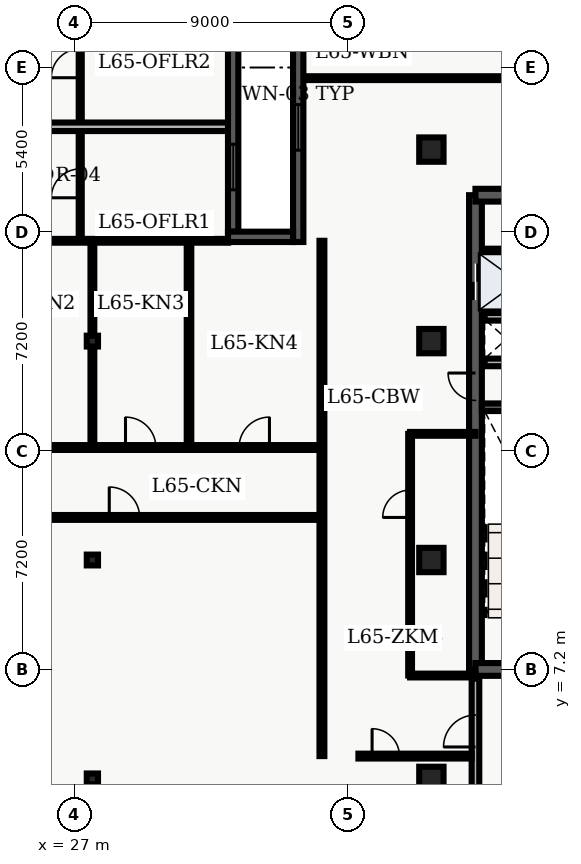
"""IFC4 building model, lengths in metres.
Left out: names, types, materials, properties, quantities, classifications, styles, units other than length and angle.
Written with IfcOpenShell. Run it as: python <this file> out.ifc"""

import sys

from ifc_helpers import new_model, entity, si_unit, converted_unit, direction, frame, origin_with_axes, origin_2d_with_axis, place, context, subcontext, project, spatial, polyline, rectangle, i_section, outline, extrude, element, fill, save


model = new_model("IFC4")
c1 = context("Model", 3, precision=1e-05, world=origin_with_axes(), true_north=direction((0.0, 1.0)))
c2 = subcontext(c1, "Body", "Model", "MODEL_VIEW")
j1 = project(units=[si_unit("LENGTHUNIT", "METRE"), converted_unit("PLANEANGLEUNIT", "DEGREE", entity("IfcPlaneAngleMeasure", 0.017), si_unit("PLANEANGLEUNIT", "RADIAN"), dimensions=[0, 0, 0, 0, 0, 0, 0])], contexts=[c1])
p1 = place(None, origin_with_axes())
s1 = spatial("IfcSite", under=j1, at=p1, CompositionType="ELEMENT")
p2 = place(p1, origin_with_axes())
s2 = spatial("IfcBuilding", under=s1, at=p2, CompositionType="ELEMENT")
p3 = place(p2, frame((0.0, 0.0, 264.6), z_axis=(0.0, 0.0, 1.0), x_axis=(1.0, 0.0, 0.0)))
s3 = spatial("IfcBuildingStorey", under=s2, at=p3, CompositionType="ELEMENT", Elevation=264.6)
p4 = place(p3, frame((40.2, 7.2, 0.0), z_axis=(0.0, 0.0, 1.0), x_axis=(0.0, 1.0, 0.0)))
e1 = element("IfcWall", 1, at=p4, inside=s3, PredefinedType="SHEAR", context=c2, shape_type="SweptSolid", body=[
    extrude(outline(polyline([(0.0, -0.21), (15.6, -0.21), (15.6, 0.21), (0.0, 0.21), (0.0, -0.21)])), origin_with_axes(), (0.0, 0.0, 1.0), 3.66),
])
p5 = place(p4, frame((12.75, 0.0, 0.0), z_axis=(0.0, 0.0, 1.0), x_axis=(1.0, 0.0, 0.0)))
e2 = element("IfcOpeningElement", 2, at=p5, cuts=e1, PredefinedType="OPENING", context=c2, shape_type="SweptSolid", body=[
    extrude(rectangle(XDim=1.2, YDim=0.44, at=origin_2d_with_axis()), origin_with_axes(), (0.0, 0.0, 1.0), 2.15),
])
p6 = place(p4, frame((9.3, 0.0, 0.0), z_axis=(0.0, 0.0, 1.0), x_axis=(1.0, 0.0, 0.0)))
e3 = element("IfcOpeningElement", 3, at=p6, cuts=e1, PredefinedType="OPENING", context=c2, shape_type="SweptSolid", body=[
    extrude(rectangle(XDim=0.9, YDim=0.44, at=origin_2d_with_axis()), origin_with_axes(), (0.0, 0.0, 1.0), 2.15),
])
p7 = place(p3, frame((40.2, 7.2, 0.0), z_axis=(0.0, 0.0, 1.0), x_axis=(1.0, 0.0, 0.0)))
e4 = element("IfcWall", 4, at=p7, inside=s3, PredefinedType="SHEAR", context=c2, shape_type="SweptSolid", body=[
    extrude(outline(polyline([(0.0, -0.21), (7.85, -0.21), (7.85, 0.21), (0.0, 0.21), (0.0, -0.21)])), origin_with_axes(), (0.0, 0.0, 1.0), 3.66),
])
p8 = place(p7, frame((2.175, 0.0, 0.0), z_axis=(0.0, 0.0, 1.0), x_axis=(1.0, 0.0, 0.0)))
e5 = element("IfcOpeningElement", 5, at=p8, cuts=e4, PredefinedType="OPENING", context=c2, shape_type="SweptSolid", body=[
    extrude(rectangle(XDim=1.05, YDim=0.44, at=origin_2d_with_axis()), origin_with_axes(), (0.0, 0.0, 1.0), 2.15),
])
p9 = place(p3, frame((40.2, 22.8, 0.0), z_axis=(0.0, 0.0, 1.0), x_axis=(1.0, 0.0, 0.0)))
e6 = element("IfcWall", 6, at=p9, inside=s3, PredefinedType="SHEAR", context=c2, shape_type="SweptSolid", body=[
    extrude(outline(polyline([(0.0, -0.21), (7.85, -0.21), (7.85, 0.21), (0.0, 0.21), (0.0, -0.21)])), origin_with_axes(), (0.0, 0.0, 1.0), 3.66),
])
p10 = place(p9, frame((5.775, 0.0, 0.0), z_axis=(0.0, 0.0, 1.0), x_axis=(1.0, 0.0, 0.0)))
e7 = element("IfcOpeningElement", 7, at=p10, cuts=e6, PredefinedType="OPENING", context=c2, shape_type="SweptSolid", body=[
    extrude(rectangle(XDim=1.05, YDim=0.44, at=origin_2d_with_axis()), origin_with_axes(), (0.0, 0.0, 1.0), 2.15),
])
p11 = place(p9, frame((2.15, 0.0, 0.0), z_axis=(0.0, 0.0, 1.0), x_axis=(1.0, 0.0, 0.0)))
e8 = element("IfcOpeningElement", 8, at=p11, cuts=e6, PredefinedType="OPENING", context=c2, shape_type="SweptSolid", body=[
    extrude(rectangle(XDim=0.9, YDim=0.44, at=origin_2d_with_axis()), origin_with_axes(), (0.0, 0.0, 1.0), 2.15),
])
p12 = place(p3, frame((40.41, 15.825, 0.0), z_axis=(0.0, 0.0, 1.0), x_axis=(1.0, 0.0, 0.0)))
e9 = element("IfcWall", 9, at=p12, inside=s3, PredefinedType="SHEAR", context=c2, shape_type="SweptSolid", body=[
    extrude(outline(polyline([(0.0, -0.125), (3.59, -0.125), (3.59, 0.125), (0.0, 0.125), (0.0, -0.125)])), origin_with_axes(), (0.0, 0.0, 1.0), 3.66),
])
p13 = place(p3, frame((40.5, 17.3, 0.0), z_axis=(0.0, 0.0, 1.0), x_axis=(1.0, 0.0, 0.0)))
e10 = element("IfcWall", 10, at=p13, inside=s3, PredefinedType="SOLIDWALL", context=c2, shape_type="SweptSolid", body=[
    extrude(outline(polyline([(0.0, -0.125), (3.5, -0.125), (3.5, 0.125), (0.0, 0.125), (0.0, -0.125)])), origin_with_axes(), (0.0, 0.0, 1.0), 2.7),
])
p14 = place(p13, frame((2.4, 0.0, 0.0), z_axis=(0.0, 0.0, 1.0), x_axis=(1.0, 0.0, 0.0)))
e11 = element("IfcOpeningElement", 11, at=p14, cuts=e10, PredefinedType="OPENING", context=c2, shape_type="SweptSolid", body=[
    extrude(rectangle(XDim=0.9, YDim=0.27, at=origin_2d_with_axis()), origin_with_axes(), (0.0, 0.0, 1.0), 2.15),
])
p15 = place(p3, frame((40.5, 18.8, 0.0), z_axis=(0.0, 0.0, 1.0), x_axis=(1.0, 0.0, 0.0)))
e12 = element("IfcWall", 12, at=p15, inside=s3, PredefinedType="SOLIDWALL", context=c2, shape_type="SweptSolid", body=[
    extrude(outline(polyline([(0.0, -0.125), (3.5, -0.125), (3.5, 0.125), (0.0, 0.125), (0.0, -0.125)])), origin_with_axes(), (0.0, 0.0, 1.0), 2.7),
])
p16 = place(p3, frame((40.2, 3.1, 0.0), z_axis=(0.0, 0.0, 1.0), x_axis=(0.0, 1.0, 0.0)))
e13 = element("IfcWall", 13, at=p16, inside=s3, PredefinedType="SOLIDWALL", context=c2, shape_type="SweptSolid", body=[
    extrude(outline(polyline([(0.0, -0.125), (3.8, -0.125), (3.8, 0.125), (0.0, 0.125), (0.0, -0.125)])), origin_with_axes(), (0.0, 0.0, 1.0), 2.7),
])
p17 = place(p16, frame((2.075, 0.0, 0.0), z_axis=(0.0, 0.0, 1.0), x_axis=(1.0, 0.0, 0.0)))
e14 = element("IfcOpeningElement", 14, at=p17, cuts=e13, PredefinedType="OPENING", context=c2, shape_type="SweptSolid", body=[
    extrude(rectangle(XDim=1.05, YDim=0.27, at=origin_2d_with_axis()), origin_with_axes(), (0.0, 0.0, 1.0), 2.15),
])
for number, where, z_axis, x_axis in (
    (15, (27.6, 3.6, 0.0), (0.0, 0.0, 1.0), (1.0, 0.0, 0.0)),
    (16, (27.6, 10.8, 0.0), (0.0, 0.0, 1.0), (1.0, 0.0, 0.0)),
    (17, (27.6, 18.0, 0.0), (0.0, 0.0, 1.0), (1.0, 0.0, 0.0)),
):
    element("IfcColumn", number, at=place(p3, frame(where, z_axis=z_axis, x_axis=x_axis)), inside=s3, PredefinedType="COLUMN", context=c2, shape_type="SweptSolid", body=[
        extrude(i_section(OverallWidth=0.369, OverallDepth=0.356, WebThickness=0.011, FlangeThickness=0.018, FilletRadius=0.018, at=origin_2d_with_axis()), origin_with_axes(), (0.0, 0.0, 1.0), 3.9),
    ])
for number, where, z_axis, x_axis in (
    (18, (38.75, 3.6, 0.0), (0.0, 0.0, 1.0), (1.0, 0.0, 0.0)),
    (19, (38.75, 10.8, 0.0), (0.0, 0.0, 1.0), (1.0, 0.0, 0.0)),
    (20, (38.75, 18.0, 0.0), (0.0, 0.0, 1.0), (1.0, 0.0, 0.0)),
    (21, (38.75, 24.3, 0.0), (0.0, 0.0, 1.0), (1.0, 0.0, 0.0)),
):
    element("IfcColumn", number, at=place(p3, frame(where, z_axis=z_axis, x_axis=x_axis)), inside=s3, PredefinedType="COLUMN", context=c2, shape_type="SweptSolid", body=[
        extrude(rectangle(XDim=0.8, YDim=0.8, at=origin_2d_with_axis()), origin_with_axes(), (0.0, 0.0, 1.0), 3.9),
    ])
p18 = place(p3, frame((40.5, 20.96, 0.0), z_axis=(0.0, 0.0, 1.0), x_axis=(1.0, 0.0, 0.0)))
e22 = element("IfcWall", 22, at=p18, inside=s3, PredefinedType="PARTITIONING", context=c2, shape_type="SweptSolid", body=[
    extrude(outline(polyline([(0.0, -0.08), (3.5, -0.08), (3.5, 0.08), (0.0, 0.08), (0.0, -0.08)])), origin_with_axes(), (0.0, 0.0, 1.0), 2.7),
])
p19 = place(p3, frame((27.2, 21.4, 0.0), z_axis=(0.0, 0.0, 1.0), x_axis=(0.0, 1.0, 0.0)))
e23 = element("IfcWall", 23, at=p19, inside=s3, PredefinedType="PARTITIONING", context=c2, shape_type="SweptSolid", body=[
    extrude(outline(polyline([(0.0, -0.05), (18.9, -0.05), (18.9, 0.05), (0.0, 0.05), (0.0, -0.05)])), origin_with_axes(), (0.0, 0.0, 1.0), 2.7),
])
p20 = place(p19, frame((1.79, 0.0, 0.0), z_axis=(0.0, 0.0, 1.0), x_axis=(1.0, 0.0, 0.0)))
e24 = element("IfcOpeningElement", 24, at=p20, cuts=e23, PredefinedType="OPENING", context=c2, shape_type="SweptSolid", body=[
    extrude(rectangle(XDim=0.95, YDim=0.12, at=origin_2d_with_axis()), origin_with_axes(), (0.0, 0.0, 1.0), 2.15),
])
p21 = place(p19, frame((5.739, 0.0, 0.0), z_axis=(0.0, 0.0, 1.0), x_axis=(1.0, 0.0, 0.0)))
e25 = element("IfcOpeningElement", 25, at=p21, cuts=e23, PredefinedType="OPENING", context=c2, shape_type="SweptSolid", body=[
    extrude(rectangle(XDim=0.95, YDim=0.12, at=origin_2d_with_axis()), origin_with_axes(), (0.0, 0.0, 1.0), 2.15),
])
p22 = place(p19, frame((10.184, 0.0, 0.0), z_axis=(0.0, 0.0, 1.0), x_axis=(1.0, 0.0, 0.0)))
e26 = element("IfcOpeningElement", 26, at=p22, cuts=e23, PredefinedType="OPENING", context=c2, shape_type="SweptSolid", body=[
    extrude(rectangle(XDim=0.95, YDim=0.12, at=origin_2d_with_axis()), origin_with_axes(), (0.0, 0.0, 1.0), 2.15),
])
p23 = place(p19, frame((14.052, 0.0, 0.0), z_axis=(0.0, 0.0, 1.0), x_axis=(1.0, 0.0, 0.0)))
e27 = element("IfcOpeningElement", 27, at=p23, cuts=e23, PredefinedType="OPENING", context=c2, shape_type="SweptSolid", body=[
    extrude(rectangle(XDim=0.95, YDim=0.12, at=origin_2d_with_axis()), origin_with_axes(), (0.0, 0.0, 1.0), 2.15),
])
p24 = place(p19, frame((17.267, 0.0, 0.0), z_axis=(0.0, 0.0, 1.0), x_axis=(1.0, 0.0, 0.0)))
e28 = element("IfcOpeningElement", 28, at=p24, cuts=e23, PredefinedType="OPENING", context=c2, shape_type="SweptSolid", body=[
    extrude(rectangle(XDim=0.95, YDim=0.12, at=origin_2d_with_axis()), origin_with_axes(), (0.0, 0.0, 1.0), 2.15),
])
p25 = place(p3, frame((20.45, 25.05, 0.0), z_axis=(0.0, 0.0, 1.0), x_axis=(1.0, 0.0, 0.0)))
e29 = element("IfcWall", 29, at=p25, inside=s3, PredefinedType="PARTITIONING", context=c2, shape_type="SweptSolid", body=[
    extrude(outline(polyline([(0.0, -0.14), (11.615, -0.14), (11.615, 0.14), (0.0, 0.14), (0.0, -0.14)])), origin_with_axes(), (0.0, 0.0, 1.0), 2.7),
])
p26 = place(p3, frame((20.3, 12.2, 0.0), z_axis=(0.0, 0.0, 1.0), x_axis=(1.0, 0.0, 0.0)))
e30 = element("IfcWall", 30, at=p26, inside=s3, PredefinedType="PARTITIONING", context=c2, shape_type="SweptSolid", body=[
    extrude(outline(polyline([(0.0, -0.08), (14.85, -0.08), (14.85, 0.08), (0.0, 0.08), (0.0, -0.08)])), origin_with_axes(), (0.0, 0.0, 1.0), 2.7),
])
p27 = place(p26, frame((8.355, 0.0, 0.0), z_axis=(0.0, 0.0, 1.0), x_axis=(1.0, 0.0, 0.0)))
e31 = element("IfcOpeningElement", 31, at=p27, cuts=e30, PredefinedType="OPENING", context=c2, shape_type="SweptSolid", body=[
    extrude(rectangle(XDim=1.0, YDim=0.18, at=origin_2d_with_axis()), origin_with_axes(), (0.0, 0.0, 1.0), 2.15),
])
p28 = place(p3, frame((20.3, 14.5, 0.0), z_axis=(0.0, 0.0, 1.0), x_axis=(1.0, 0.0, 0.0)))
e32 = element("IfcWall", 32, at=p28, inside=s3, PredefinedType="PARTITIONING", context=c2, shape_type="SweptSolid", body=[
    extrude(outline(polyline([(0.0, -0.08), (14.85, -0.08), (14.85, 0.08), (0.0, 0.08), (0.0, -0.08)])), origin_with_axes(), (0.0, 0.0, 1.0), 2.7),
])
p29 = place(p28, frame((1.739, 0.0, 0.0), z_axis=(0.0, 0.0, 1.0), x_axis=(1.0, 0.0, 0.0)))
e33 = element("IfcOpeningElement", 33, at=p29, cuts=e32, PredefinedType="OPENING", context=c2, shape_type="SweptSolid", body=[
    extrude(rectangle(XDim=1.0, YDim=0.18, at=origin_2d_with_axis()), origin_with_axes(), (0.0, 0.0, 1.0), 2.15),
])
p30 = place(p28, frame((5.299, 0.0, 0.0), z_axis=(0.0, 0.0, 1.0), x_axis=(1.0, 0.0, 0.0)))
e34 = element("IfcOpeningElement", 34, at=p30, cuts=e32, PredefinedType="OPENING", context=c2, shape_type="SweptSolid", body=[
    extrude(rectangle(XDim=1.0, YDim=0.18, at=origin_2d_with_axis()), origin_with_axes(), (0.0, 0.0, 1.0), 2.15),
])
p31 = place(p28, frame((8.889, 0.0, 0.0), z_axis=(0.0, 0.0, 1.0), x_axis=(1.0, 0.0, 0.0)))
e35 = element("IfcOpeningElement", 35, at=p31, cuts=e32, PredefinedType="OPENING", context=c2, shape_type="SweptSolid", body=[
    extrude(rectangle(XDim=1.0, YDim=0.18, at=origin_2d_with_axis()), origin_with_axes(), (0.0, 0.0, 1.0), 2.15),
])
p32 = place(p28, frame((12.624, 0.0, 0.0), z_axis=(0.0, 0.0, 1.0), x_axis=(1.0, 0.0, 0.0)))
e36 = element("IfcOpeningElement", 36, at=p32, cuts=e32, PredefinedType="OPENING", context=c2, shape_type="SweptSolid", body=[
    extrude(rectangle(XDim=1.0, YDim=0.18, at=origin_2d_with_axis()), origin_with_axes(), (0.0, 0.0, 1.0), 2.15),
])
p33 = place(p3, frame((35.15, 4.35, 0.0), z_axis=(0.0, 0.0, 1.0), x_axis=(0.0, 1.0, 0.0)))
e37 = element("IfcWall", 37, at=p33, inside=s3, PredefinedType="PARTITIONING", context=c2, shape_type="SweptSolid", body=[
    extrude(outline(polyline([(0.0, -0.08), (16.95, -0.08), (16.95, 0.08), (0.0, 0.08), (0.0, -0.08)])), origin_with_axes(), (0.0, 0.0, 1.0), 2.7),
])
p34 = place(p3, frame((27.6, 14.62, 0.0), z_axis=(0.0, 0.0, 1.0), x_axis=(0.0, 1.0, 0.0)))
e38 = element("IfcWall", 38, at=p34, inside=s3, PredefinedType="PARTITIONING", context=c2, shape_type="SweptSolid", body=[
    extrude(outline(polyline([(0.0, -0.062), (6.6, -0.062), (6.6, 0.062), (0.0, 0.062), (0.0, -0.062)])), origin_with_axes(), (0.0, 0.0, 1.0), 2.7),
])
p35 = place(p3, frame((30.778, 14.62, 0.0), z_axis=(0.0, 0.0, 1.0), x_axis=(0.0, 1.0, 0.0)))
e39 = element("IfcWall", 39, at=p35, inside=s3, PredefinedType="PARTITIONING", context=c2, shape_type="SweptSolid", body=[
    extrude(outline(polyline([(0.0, -0.075), (6.6, -0.075), (6.6, 0.075), (0.0, 0.075), (0.0, -0.075)])), origin_with_axes(), (0.0, 0.0, 1.0), 2.7),
])
p36 = place(p3, frame((34.535, 26.65, 0.0), z_axis=(0.0, 0.0, 1.0), x_axis=(1.0, 0.0, 0.0)))
e40 = element("IfcWall", 40, at=p36, inside=s3, PredefinedType="PARTITIONING", context=c2, shape_type="SweptSolid", body=[
    extrude(outline(polyline([(0.0, -0.062), (12.995, -0.062), (12.995, 0.062), (0.0, 0.062), (0.0, -0.062)])), origin_with_axes(), (0.0, 0.0, 1.0), 2.7),
])
p37 = place(p36, frame((8.465, 0.0, 0.0), z_axis=(0.0, 0.0, 1.0), x_axis=(1.0, 0.0, 0.0)))
e41 = element("IfcOpeningElement", 41, at=p37, cuts=e40, PredefinedType="OPENING", context=c2, shape_type="SweptSolid", body=[
    extrude(rectangle(XDim=1.0, YDim=0.145, at=origin_2d_with_axis()), origin_with_axes(), (0.0, 0.0, 1.0), 2.15),
])
p38 = place(p3, frame((20.3, 21.3, 0.0), z_axis=(0.0, 0.0, 1.0), x_axis=(1.0, 0.0, 0.0)))
e42 = element("IfcWall", 42, at=p38, inside=s3, PredefinedType="PARTITIONING", context=c2, shape_type="SweptSolid", body=[
    extrude(outline(polyline([(0.0, -0.062), (11.765, -0.062), (11.765, 0.062), (0.0, 0.062), (0.0, -0.062)])), origin_with_axes(), (0.0, 0.0, 1.0), 2.7),
])
p39 = place(p3, frame((36.35, 4.35, 0.0), z_axis=(0.0, 0.0, 1.0), x_axis=(1.0, 0.0, 0.0)))
e43 = element("IfcWall", 43, at=p39, inside=s3, PredefinedType="PARTITIONING", context=c2, shape_type="SweptSolid", body=[
    extrude(outline(polyline([(0.0, -0.08), (3.725, -0.08), (3.725, 0.08), (0.0, 0.08), (0.0, -0.08)])), origin_with_axes(), (0.0, 0.0, 1.0), 2.7),
])
p40 = place(p39, frame((0.9, 0.0, 0.0), z_axis=(0.0, 0.0, 1.0), x_axis=(1.0, 0.0, 0.0)))
e44 = element("IfcOpeningElement", 44, at=p40, cuts=e43, PredefinedType="OPENING", context=c2, shape_type="SweptSolid", body=[
    extrude(rectangle(XDim=0.9, YDim=0.18, at=origin_2d_with_axis()), origin_with_axes(), (0.0, 0.0, 1.0), 2.15),
])
for number, where, z_axis, x_axis in (
    (45, (38.05, 7.0, 0.0), (0.0, 0.0, 1.0), (1.0, 0.0, 0.0)),
    (46, (38.05, 14.95, 0.0), (0.0, 0.0, 1.0), (1.0, 0.0, 0.0)),
):
    element("IfcWall", number, at=place(p3, frame(where, z_axis=z_axis, x_axis=x_axis)), inside=s3, PredefinedType="PARTITIONING", context=c2, shape_type="SweptSolid", body=[
        extrude(outline(polyline([(0.0, -0.062), (2.15, -0.062), (2.15, 0.062), (0.0, 0.062), (0.0, -0.062)])), origin_with_axes(), (0.0, 0.0, 1.0), 2.7),
    ])
p41 = place(p3, frame((38.05, 7.0, 0.0), z_axis=(0.0, 0.0, 1.0), x_axis=(0.0, 1.0, 0.0)))
e47 = element("IfcWall", 47, at=p41, inside=s3, PredefinedType="PARTITIONING", context=c2, shape_type="SweptSolid", body=[
    extrude(outline(polyline([(0.0, -0.062), (7.95, -0.062), (7.95, 0.062), (0.0, 0.062), (0.0, -0.062)])), origin_with_axes(), (0.0, 0.0, 1.0), 2.7),
])
p42 = place(p41, frame((5.65, 0.0, 0.0), z_axis=(0.0, 0.0, 1.0), x_axis=(1.0, 0.0, 0.0)))
e48 = element("IfcOpeningElement", 48, at=p42, cuts=e47, PredefinedType="OPENING", context=c2, shape_type="SweptSolid", body=[
    extrude(rectangle(XDim=0.9, YDim=0.145, at=origin_2d_with_axis()), origin_with_axes(), (0.0, 0.0, 1.0), 2.15),
])
p43 = place(p3, frame((34.37, 21.26, 0.0), z_axis=(0.0, 0.0, 1.0), x_axis=(0.0, 1.0, 0.0)))
e49 = element("IfcWall", 49, at=p43, inside=s3, PredefinedType="SOLIDWALL", context=c2, shape_type="SweptSolid", body=[
    extrude(outline(polyline([(0.0, -0.17), (7.54, -0.17), (7.54, 0.17), (0.0, 0.17), (0.0, -0.17)])), origin_with_axes(), (0.0, 0.0, 1.0), 3.66),
])
p44 = place(p43, frame((3.77, 0.0, 0.45), z_axis=(0.0, 0.0, 1.0), x_axis=(1.0, 0.0, 0.0)))
e50 = element("IfcOpeningElement", 50, at=p44, cuts=e49, PredefinedType="OPENING", context=c2, shape_type="SweptSolid", body=[
    extrude(rectangle(XDim=1.5, YDim=0.36, at=origin_2d_with_axis()), origin_with_axes(), (0.0, 0.0, 1.0), 2.1),
])
p45 = place(p3, frame((32.23, 41.82, 0.0), z_axis=(0.0, 0.0, 1.0), x_axis=(0.0, -1.0, 0.0)))
e51 = element("IfcWall", 51, at=p45, inside=s3, PredefinedType="SOLIDWALL", context=c2, shape_type="SweptSolid", body=[
    extrude(outline(polyline([(0.0, -0.17), (20.22, -0.17), (20.22, 0.17), (0.0, 0.17), (0.0, -0.17)])), origin_with_axes(), (0.0, 0.0, 1.0), 3.66),
])
p46 = place(p45, frame((2.978, 0.0, 0.45), z_axis=(0.0, 0.0, 1.0), x_axis=(1.0, 0.0, 0.0)))
e52 = element("IfcOpeningElement", 52, at=p46, cuts=e51, PredefinedType="OPENING", context=c2, shape_type="SweptSolid", body=[
    extrude(rectangle(XDim=1.5, YDim=0.36, at=origin_2d_with_axis()), origin_with_axes(), (0.0, 0.0, 1.0), 2.1),
])
p47 = place(p45, frame((18.092, 0.0, 0.45), z_axis=(0.0, 0.0, 1.0), x_axis=(1.0, 0.0, 0.0)))
e53 = element("IfcOpeningElement", 53, at=p47, cuts=e51, PredefinedType="OPENING", context=c2, shape_type="SweptSolid", body=[
    extrude(rectangle(XDim=1.5, YDim=0.36, at=origin_2d_with_axis()), origin_with_axes(), (0.0, 0.0, 1.0), 2.1),
])
p48 = place(p3, frame((32.06, 21.43, 0.0), z_axis=(0.0, 0.0, 1.0), x_axis=(1.0, 0.0, 0.0)))
e54 = element("IfcWall", 54, at=p48, inside=s3, PredefinedType="SOLIDWALL", context=c2, shape_type="SweptSolid", body=[
    extrude(outline(polyline([(0.0, -0.17), (2.14, -0.17), (2.14, 0.17), (0.0, 0.17), (0.0, -0.17)])), origin_with_axes(), (0.0, 0.0, 1.0), 3.66),
])
p49 = place(p4, frame((12.75, 0.0, 0.0), z_axis=(0.0, 0.0, 1.0), x_axis=(1.0, 0.0, 0.0)))
e55 = element("IfcDoor", 55, at=p49, inside=s3, OperationType="DOUBLE_DOOR_SLIDING", PredefinedType="DOOR", context=c2, shape_type="SweptSolid", body=[
    extrude(rectangle(XDim=1.2, YDim=0.09, at=origin_2d_with_axis()), origin_with_axes(), (0.0, 0.0, 1.0), 2.15),
])
fill(e2, e55)
p50 = place(p4, frame((9.3, 0.0, 0.0), z_axis=(0.0, 0.0, 1.0), x_axis=(1.0, 0.0, 0.0)))
e56 = element("IfcDoor", 56, at=p50, inside=s3, OperationType="SINGLE_SWING_RIGHT", PredefinedType="DOOR", context=c2, shape_type="SweptSolid", body=[
    extrude(rectangle(XDim=0.9, YDim=0.09, at=origin_2d_with_axis()), origin_with_axes(), (0.0, 0.0, 1.0), 2.15),
])
fill(e3, e56)
p51 = place(p16, frame((2.075, 0.0, 0.0), z_axis=(0.0, 0.0, 1.0), x_axis=(1.0, 0.0, 0.0)))
e57 = element("IfcDoor", 57, at=p51, inside=s3, OperationType="SINGLE_SWING_LEFT", PredefinedType="DOOR", context=c2, shape_type="SweptSolid", body=[
    extrude(rectangle(XDim=1.05, YDim=0.09, at=origin_2d_with_axis()), origin_with_axes(), (0.0, 0.0, 1.0), 2.15),
])
fill(e14, e57)
p52 = place(p19, frame((1.79, 0.0, 0.0), z_axis=(0.0, 0.0, 1.0), x_axis=(1.0, 0.0, 0.0)))
e58 = element("IfcDoor", 58, at=p52, inside=s3, OperationType="SINGLE_SWING_LEFT", PredefinedType="DOOR", context=c2, shape_type="SweptSolid", body=[
    extrude(rectangle(XDim=0.95, YDim=0.06, at=origin_2d_with_axis()), origin_with_axes(), (0.0, 0.0, 1.0), 2.15),
])
fill(e24, e58)
p53 = place(p19, frame((5.739, 0.0, 0.0), z_axis=(0.0, 0.0, 1.0), x_axis=(1.0, 0.0, 0.0)))
e59 = element("IfcDoor", 59, at=p53, inside=s3, OperationType="SINGLE_SWING_LEFT", PredefinedType="DOOR", context=c2, shape_type="SweptSolid", body=[
    extrude(rectangle(XDim=0.95, YDim=0.06, at=origin_2d_with_axis()), origin_with_axes(), (0.0, 0.0, 1.0), 2.15),
])
fill(e25, e59)
p54 = place(p26, frame((8.355, 0.0, 0.0), z_axis=(0.0, 0.0, 1.0), x_axis=(1.0, 0.0, 0.0)))
e60 = element("IfcDoor", 60, at=p54, inside=s3, OperationType="SINGLE_SWING_LEFT", PredefinedType="DOOR", context=c2, shape_type="SweptSolid", body=[
    extrude(rectangle(XDim=1.0, YDim=0.09, at=origin_2d_with_axis()), origin_with_axes(), (0.0, 0.0, 1.0), 2.15),
])
fill(e31, e60)
p55 = place(p28, frame((8.889, 0.0, 0.0), z_axis=(0.0, 0.0, 1.0), x_axis=(1.0, 0.0, 0.0)))
e61 = element("IfcDoor", 61, at=p55, inside=s3, OperationType="SINGLE_SWING_LEFT", PredefinedType="DOOR", context=c2, shape_type="SweptSolid", body=[
    extrude(rectangle(XDim=1.0, YDim=0.09, at=origin_2d_with_axis()), origin_with_axes(), (0.0, 0.0, 1.0), 2.15),
])
fill(e35, e61)
p56 = place(p28, frame((12.624, 0.0, 0.0), z_axis=(0.0, 0.0, 1.0), x_axis=(1.0, 0.0, 0.0)))
e62 = element("IfcDoor", 62, at=p56, inside=s3, OperationType="SINGLE_SWING_RIGHT", PredefinedType="DOOR", context=c2, shape_type="SweptSolid", body=[
    extrude(rectangle(XDim=1.0, YDim=0.09, at=origin_2d_with_axis()), origin_with_axes(), (0.0, 0.0, 1.0), 2.15),
])
fill(e36, e62)
p57 = place(p39, frame((0.9, 0.0, 0.0), z_axis=(0.0, 0.0, 1.0), x_axis=(1.0, 0.0, 0.0)))
e63 = element("IfcDoor", 63, at=p57, inside=s3, OperationType="SINGLE_SWING_LEFT", PredefinedType="DOOR", context=c2, shape_type="SweptSolid", body=[
    extrude(rectangle(XDim=0.9, YDim=0.09, at=origin_2d_with_axis()), origin_with_axes(), (0.0, 0.0, 1.0), 2.15),
])
fill(e44, e63)
p58 = place(p41, frame((5.65, 0.0, 0.0), z_axis=(0.0, 0.0, 1.0), x_axis=(1.0, 0.0, 0.0)))
e64 = element("IfcDoor", 64, at=p58, inside=s3, OperationType="SINGLE_SWING_LEFT", PredefinedType="DOOR", context=c2, shape_type="SweptSolid", body=[
    extrude(rectangle(XDim=0.9, YDim=0.075, at=origin_2d_with_axis()), origin_with_axes(), (0.0, 0.0, 1.0), 2.15),
])
fill(e48, e64)
p59 = place(p43, frame((3.77, 0.0, 0.45), z_axis=(0.0, 0.0, 1.0), x_axis=(1.0, 0.0, 0.0)))
e65 = element("IfcWindow", 65, at=p59, inside=s3, PredefinedType="WINDOW", context=c2, shape_type="SweptSolid", body=[
    extrude(rectangle(XDim=1.5, YDim=0.09, at=origin_2d_with_axis()), origin_with_axes(), (0.0, 0.0, 1.0), 2.1),
])
fill(e50, e65)
p60 = place(p45, frame((18.092, 0.0, 0.45), z_axis=(0.0, 0.0, 1.0), x_axis=(1.0, 0.0, 0.0)))
e66 = element("IfcWindow", 66, at=p60, inside=s3, PredefinedType="WINDOW", context=c2, shape_type="SweptSolid", body=[
    extrude(rectangle(XDim=1.5, YDim=0.09, at=origin_2d_with_axis()), origin_with_axes(), (0.0, 0.0, 1.0), 2.1),
])
fill(e53, e66)
save(model, sys.argv[1])
